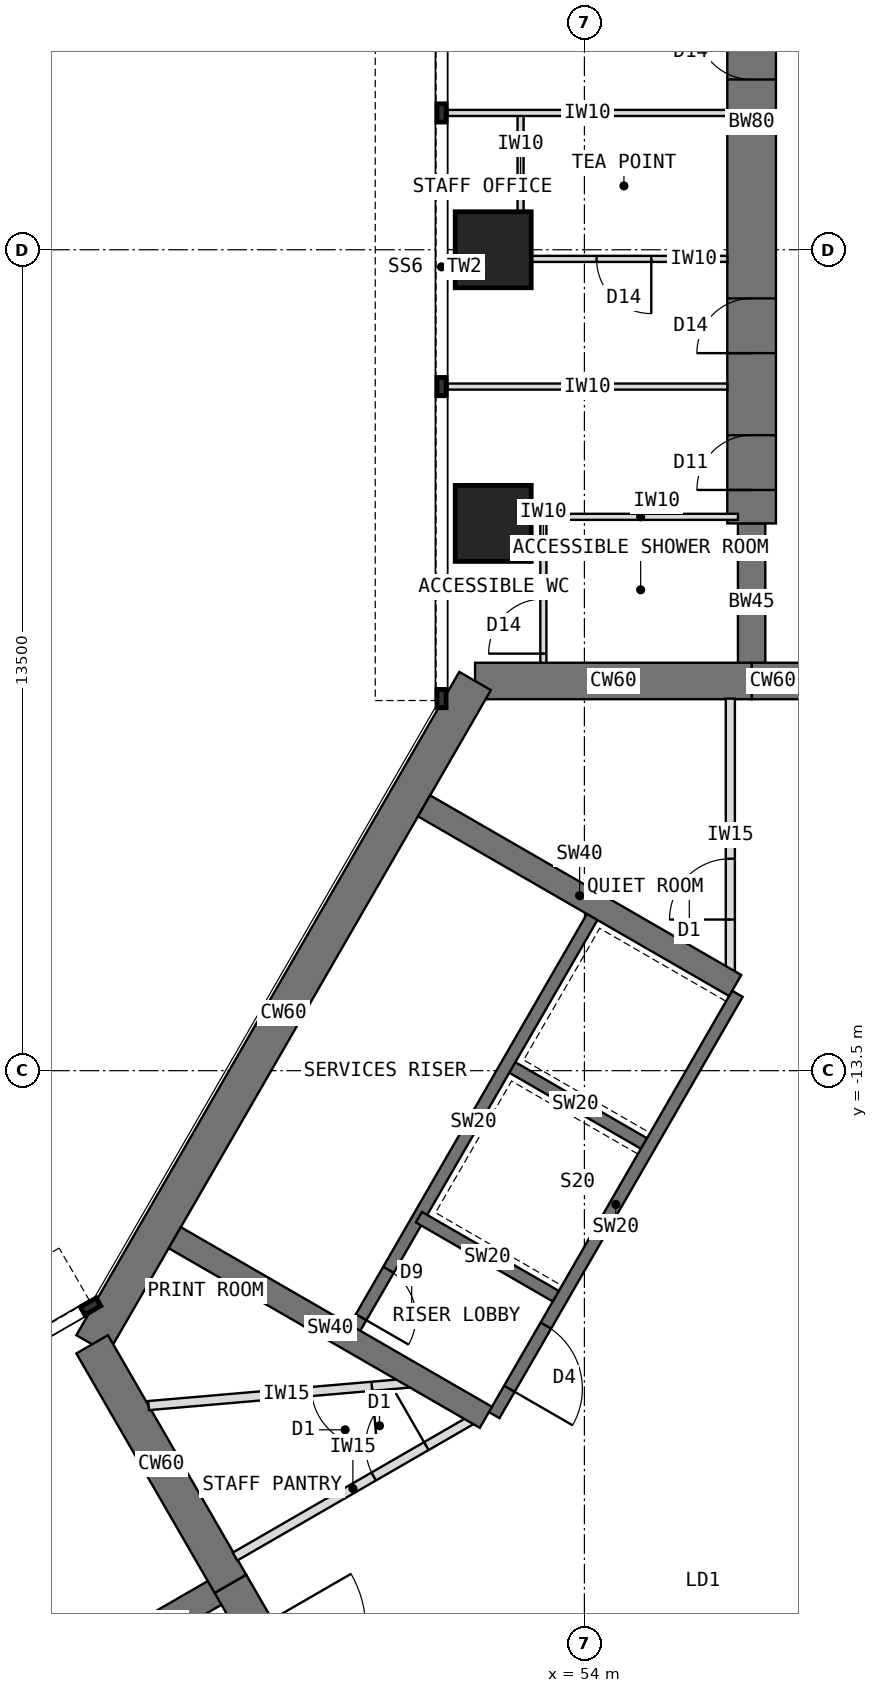
"""IFC4 building model, lengths in metres.
Left out: names, types, materials, properties, quantities, classifications, styles, units other than length and angle.
Written with IfcOpenShell. Run it as: python <this file> out.ifc"""

import sys

from ifc_helpers import new_model, si_unit, direction, frame, frame_2d, origin, origin_2d, place, context, subcontext, project, spatial, rectangle, extrude, element, fill, save


model = new_model("IFC4")
c1 = context("Model", 3, precision=1e-05, world=origin(), true_north=direction((0.0, 1.0)))
c2 = subcontext(c1, "Body", "Model", "MODEL_VIEW")
j1 = project(units=[si_unit("LENGTHUNIT", "METRE"), si_unit("PLANEANGLEUNIT", "RADIAN")], contexts=[c1])
p1 = place(None, origin())
s1 = spatial("IfcSite", under=j1, at=p1, CompositionType="ELEMENT")
p2 = place(p1, origin())
s2 = spatial("IfcBuilding", under=s1, at=p2, CompositionType="ELEMENT")
p3 = place(p2, frame((0.0, 0.0, 157.5)))
s3 = spatial("IfcBuildingStorey", under=s2, at=p3, CompositionType="ELEMENT", Elevation=157.5)
p4 = place(p3, frame((60.25, -7.092, 0.0), z_axis=(0.0, 0.0, 1.0), x_axis=(-1.0, 0.0, 0.0)))
e1 = element("IfcWall", 1, at=p4, inside=s3, PredefinedType="SHEAR", context=c2, shape_type="SweptSolid", body=[
    extrude(rectangle(XDim=3.5, YDim=0.6, at=frame_2d((1.75, 0.0))), origin(), (0.0, 0.0, 1.0), 4.0),
])
p5 = place(p4, frame((0.85, 0.0, 0.0)))
e2 = element("IfcOpeningElement", 2, at=p5, cuts=e1, PredefinedType="OPENING", context=c2, shape_type="SweptSolid", body=[
    extrude(rectangle(XDim=1.8, YDim=2.1, at=frame_2d((0.9, 1.05))), frame((0.0, 0.31, 0.0), z_axis=(0.0, -1.0, 0.0), x_axis=(1.0, 0.0, 0.0)), (0.0, 0.0, 1.0), 0.62),
])
p6 = place(p3, frame((56.75, -7.092, 0.0), z_axis=(0.0, 0.0, 1.0), x_axis=(-1.0, 0.0, 0.0)))
e3 = element("IfcWall", 3, at=p6, inside=s3, PredefinedType="SHEAR", context=c2, shape_type="SweptSolid", body=[
    extrude(rectangle(XDim=4.548, YDim=0.6, at=frame_2d((2.274, 0.0))), origin(), (0.0, 0.0, 1.0), 4.0),
])
p7 = place(p3, frame((52.202, -7.092, 0.0), z_axis=(0.0, 0.0, 1.0), x_axis=(-0.500005998175, -0.866021940709, 0.0)))
e4 = element("IfcWall", 4, at=p7, inside=s3, PredefinedType="SHEAR", context=c2, shape_type="SweptSolid", body=[
    extrude(rectangle(XDim=12.596, YDim=0.6, at=frame_2d((6.298, 0.0))), origin(), (0.0, 0.0, 1.0), 4.0),
])
p8 = place(p3, frame((45.904, -18.0, 0.0), z_axis=(0.0, 0.0, 1.0), x_axis=(0.500024481964, -0.866011268655, 0.0)))
e5 = element("IfcWall", 5, at=p8, inside=s3, PredefinedType="SHEAR", context=c2, shape_type="SweptSolid", body=[
    extrude(rectangle(XDim=4.548, YDim=0.6, at=frame_2d((2.274, 0.0))), origin(), (0.0, 0.0, 1.0), 4.0),
])
p9 = place(p3, frame((48.178, -21.939, 0.0), z_axis=(0.0, 0.0, 1.0), x_axis=(0.500010275428, -0.866019471182, 0.0)))
e6 = element("IfcWall", 6, at=p9, inside=s3, PredefinedType="SHEAR", context=c2, shape_type="SweptSolid", body=[
    extrude(rectangle(XDim=3.5, YDim=0.6, at=frame_2d((1.75, 0.0))), origin(), (0.0, 0.0, 1.0), 4.0),
])
p10 = place(p9, frame((0.85, 0.0, 0.0)))
e7 = element("IfcOpeningElement", 7, at=p10, cuts=e6, PredefinedType="OPENING", context=c2, shape_type="SweptSolid", body=[
    extrude(rectangle(XDim=1.8, YDim=2.1, at=frame_2d((0.9, 1.05))), frame((0.0, 0.31, 0.0), z_axis=(0.0, -1.0, 0.0), x_axis=(1.0, 0.0, 0.0)), (0.0, 0.0, 1.0), 0.62),
])
p11 = place(p3, frame((56.75, -7.092, 0.0), z_axis=(0.0, 0.0, 1.0), x_axis=(0.0, 1.0, 0.0)))
e8 = element("IfcWall", 8, at=p11, inside=s3, PredefinedType="SHEAR", context=c2, shape_type="SweptSolid", body=[
    extrude(rectangle(XDim=2.592, YDim=0.45, at=frame_2d((1.296, 0.0))), origin(), (0.0, 0.0, 1.0), 4.0),
])
p12 = place(p3, frame((56.75, -4.5, 0.0), z_axis=(0.0, 0.0, 1.0), x_axis=(0.0, 1.0, 0.0)))
e9 = element("IfcWall", 9, at=p12, inside=s3, PredefinedType="SHEAR", context=c2, shape_type="SweptSolid", body=[
    extrude(rectangle(XDim=13.2, YDim=0.8, at=frame_2d((6.6, 0.0))), origin(), (0.0, 0.0, 1.0), 4.0),
])
p13 = place(p12, frame((0.55, 0.0, 0.0)))
e10 = element("IfcOpeningElement", 10, at=p13, cuts=e9, PredefinedType="OPENING", context=c2, shape_type="SweptSolid", body=[
    extrude(rectangle(XDim=0.9, YDim=2.1, at=frame_2d((0.45, 1.05))), frame((0.0, 0.41, 0.0), z_axis=(0.0, -1.0, 0.0), x_axis=(1.0, 0.0, 0.0)), (0.0, 0.0, 1.0), 0.82),
])
p14 = place(p12, frame((2.8, 0.0, 0.0)))
e11 = element("IfcOpeningElement", 11, at=p14, cuts=e9, PredefinedType="OPENING", context=c2, shape_type="SweptSolid", body=[
    extrude(rectangle(XDim=0.9, YDim=2.1, at=frame_2d((0.45, 1.05))), frame((0.0, 0.41, 0.0), z_axis=(0.0, -1.0, 0.0), x_axis=(1.0, 0.0, 0.0)), (0.0, 0.0, 1.0), 0.82),
])
p15 = place(p12, frame((7.3, 0.0, 0.0)))
e12 = element("IfcOpeningElement", 12, at=p15, cuts=e9, PredefinedType="OPENING", context=c2, shape_type="SweptSolid", body=[
    extrude(rectangle(XDim=0.9, YDim=2.1, at=frame_2d((0.45, 1.05))), frame((0.0, 0.41, 0.0), z_axis=(0.0, -1.0, 0.0), x_axis=(1.0, 0.0, 0.0)), (0.0, 0.0, 1.0), 0.82),
])
p16 = place(p3, frame((48.178, -21.939, 0.0), z_axis=(0.0, 0.0, 1.0), x_axis=(-0.866072649678, -0.499918158782, 0.0)))
e13 = element("IfcWall", 13, at=p16, inside=s3, PredefinedType="SHEAR", context=c2, shape_type="SweptSolid", body=[
    extrude(rectangle(XDim=2.592, YDim=0.45, at=frame_2d((1.296, 0.0))), origin(), (0.0, 0.0, 1.0), 4.0),
])
for number, where, z_axis, x_axis in (
    (14, (52.5, -4.5, 0.0), (0.0, 0.0, 1.0), (1.0, 0.0, 0.0)),
    (15, (52.5, 0.0, 0.0), (0.0, 0.0, 1.0), (1.0, 0.0, 0.0)),
):
    element("IfcColumn", number, at=place(p3, frame(where, z_axis=z_axis, x_axis=x_axis)), inside=s3, PredefinedType="COLUMN", context=c2, shape_type="SweptSolid", body=[
        extrude(rectangle(XDim=1.25, YDim=1.25, at=origin_2d()), origin(), (0.0, 0.0, 1.0), 4.0),
    ])
p17 = place(p3, frame((56.516, -12.236, 0.0), z_axis=(0.0, 0.0, 1.0), x_axis=(-0.49999894854, -0.866026010844, 0.0)))
e16 = element("IfcWall", 16, at=p17, inside=s3, PredefinedType="SHEAR", context=c2, shape_type="SweptSolid", body=[
    extrude(rectangle(XDim=8.0, YDim=0.2, at=frame_2d((4.0, 0.0))), origin(), (0.0, 0.0, 1.0), 4.0),
])
p18 = place(p17, frame((6.3, 0.0, 0.0)))
e17 = element("IfcOpeningElement", 17, at=p18, cuts=e16, PredefinedType="OPENING", context=c2, shape_type="SweptSolid", body=[
    extrude(rectangle(XDim=1.2, YDim=2.1, at=frame_2d((0.6, 1.05))), frame((0.0, 0.11, 0.0), z_axis=(0.0, -1.0, 0.0), x_axis=(1.0, 0.0, 0.0)), (0.0, 0.0, 1.0), 0.22),
])
for number, where, z_axis, x_axis in (
    (18, (54.98, -14.697, 0.0), (0.0, 0.0, 1.0), (-0.866, 0.5, 0.0)),
    (19, (53.53, -17.209, 0.0), (0.0, 0.0, 1.0), (-0.866, 0.5, 0.0)),
):
    element("IfcWall", number, at=place(p3, frame(where, z_axis=z_axis, x_axis=x_axis)), inside=s3, PredefinedType="SHEAR", context=c2, shape_type="SweptSolid", body=[
        extrude(rectangle(XDim=2.6, YDim=0.2, at=frame_2d((1.3, 0.0))), origin(), (0.0, 0.0, 1.0), 4.0),
    ])
p19 = place(p3, frame((54.178, -10.886, 0.0), z_axis=(0.0, 0.0, 1.0), x_axis=(-0.49999894854, -0.866026010844, 0.0)))
e20 = element("IfcWall", 20, at=p19, inside=s3, PredefinedType="SHEAR", context=c2, shape_type="SweptSolid", body=[
    extrude(rectangle(XDim=8.0, YDim=0.2, at=frame_2d((4.0, 0.0))), origin(), (0.0, 0.0, 1.0), 4.0),
])
p20 = place(p19, frame((6.8, 0.0, 0.0)))
e21 = element("IfcOpeningElement", 21, at=p20, cuts=e20, PredefinedType="OPENING", context=c2, shape_type="SweptSolid", body=[
    extrude(rectangle(XDim=0.9, YDim=2.1, at=frame_2d((0.45, 1.05))), frame((0.0, 0.11, 0.0), z_axis=(0.0, -1.0, 0.0), x_axis=(1.0, 0.0, 0.0)), (0.0, 0.0, 1.0), 0.22),
])
p21 = place(p3, frame((52.38, -19.201, 0.0), z_axis=(0.0, 0.0, 1.0), x_axis=(-0.866027317282, 0.49999668571, 0.0)))
e22 = element("IfcWall", 22, at=p21, inside=s3, PredefinedType="SHEAR", context=c2, shape_type="SweptSolid", body=[
    extrude(rectangle(XDim=5.908, YDim=0.4, at=frame_2d((2.954, 0.0))), origin(), (0.0, 0.0, 1.0), 4.0),
])
p22 = place(p3, frame((56.48, -12.099, 0.0), z_axis=(0.0, 0.0, 1.0), x_axis=(-0.866009424208, 0.500027676417, 0.0)))
e23 = element("IfcWall", 23, at=p22, inside=s3, PredefinedType="SHEAR", context=c2, shape_type="SweptSolid", body=[
    extrude(rectangle(XDim=5.908, YDim=0.4, at=frame_2d((2.954, 0.0))), origin(), (0.0, 0.0, 1.0), 4.0),
])
for number, where, z_axis, x_axis in (
    (24, (56.35, -2.25, 0.0), (0.0, 0.0, 1.0), (-1.0, 0.0, 0.0)),
    (25, (56.35, 2.25, 0.0), (0.0, 0.0, 1.0), (-1.0, 0.0, 0.0)),
):
    element("IfcWall", number, at=place(p3, frame(where, z_axis=z_axis, x_axis=x_axis)), inside=s3, PredefinedType="PARTITIONING", context=c2, shape_type="SweptSolid", body=[
        extrude(rectangle(XDim=4.6, YDim=0.1, at=frame_2d((2.3, 0.0))), origin(), (0.0, 0.0, 1.0), 3.8),
    ])
p23 = place(p3, frame((52.95, -0.15, 0.0), z_axis=(0.0, 0.0, 1.0), x_axis=(0.0, 1.0, 0.0)))
e26 = element("IfcWall", 26, at=p23, inside=s3, PredefinedType="PARTITIONING", context=c2, shape_type="SweptSolid", body=[
    extrude(rectangle(XDim=2.4, YDim=0.1, at=frame_2d((1.2, 0.0))), origin(), (0.0, 0.0, 1.0), 3.8),
])
p24 = place(p3, frame((56.35, -0.15, 0.0), z_axis=(0.0, 0.0, 1.0), x_axis=(-1.0, 0.0, 0.0)))
e27 = element("IfcWall", 27, at=p24, inside=s3, PredefinedType="PARTITIONING", context=c2, shape_type="SweptSolid", body=[
    extrude(rectangle(XDim=3.4, YDim=0.1, at=frame_2d((1.7, 0.0))), origin(), (0.0, 0.0, 1.0), 3.8),
])
p25 = place(p24, frame((1.25, 0.0, 0.0)))
e28 = element("IfcOpeningElement", 28, at=p25, cuts=e27, PredefinedType="OPENING", context=c2, shape_type="SweptSolid", body=[
    extrude(rectangle(XDim=0.9, YDim=2.1, at=frame_2d((0.45, 1.05))), frame((0.0, 0.06, 0.0), z_axis=(0.0, -1.0, 0.0), x_axis=(1.0, 0.0, 0.0)), (0.0, 0.0, 1.0), 0.12),
])
p26 = place(p3, frame((53.325, -6.792, 0.0), z_axis=(0.0, 0.0, 1.0), x_axis=(0.0, 1.0, 0.0)))
e29 = element("IfcWall", 29, at=p26, inside=s3, PredefinedType="PARTITIONING", context=c2, shape_type="SweptSolid", body=[
    extrude(rectangle(XDim=2.4, YDim=0.1, at=frame_2d((1.2, 0.0))), origin(), (0.0, 0.0, 1.0), 3.8),
])
p27 = place(p26, frame((0.15, 0.0, 0.0)))
e30 = element("IfcOpeningElement", 30, at=p27, cuts=e29, PredefinedType="OPENING", context=c2, shape_type="SweptSolid", body=[
    extrude(rectangle(XDim=0.9, YDim=2.1, at=frame_2d((0.45, 1.05))), frame((0.0, 0.06, 0.0), z_axis=(0.0, -1.0, 0.0), x_axis=(1.0, 0.0, 0.0)), (0.0, 0.0, 1.0), 0.12),
])
p28 = place(p3, frame((56.525, -4.392, 0.0), z_axis=(0.0, 0.0, 1.0), x_axis=(-1.0, 0.0, 0.0)))
e31 = element("IfcWall", 31, at=p28, inside=s3, PredefinedType="PARTITIONING", context=c2, shape_type="SweptSolid", body=[
    extrude(rectangle(XDim=3.2, YDim=0.1, at=frame_2d((1.6, 0.0))), origin(), (0.0, 0.0, 1.0), 3.8),
])
p29 = place(p3, frame((48.254, -21.49, 0.0), z_axis=(0.0, 0.0, 1.0), x_axis=(0.866025707867, 0.499999473313, 0.0)))
e32 = element("IfcWall", 32, at=p29, inside=s3, PredefinedType="PARTITIONING", context=c2, shape_type="SweptSolid", body=[
    extrude(rectangle(XDim=4.476, YDim=0.15, at=frame_2d((2.238, 0.0))), origin(), (0.0, 0.0, 1.0), 3.8),
])
p30 = place(p29, frame((2.633, 0.0, 0.0)))
e33 = element("IfcOpeningElement", 33, at=p30, cuts=e32, PredefinedType="OPENING", context=c2, shape_type="SweptSolid", body=[
    extrude(rectangle(XDim=1.0, YDim=2.1, at=frame_2d((0.5, 1.05))), frame((0.0, 0.085, 0.0), z_axis=(0.0, -1.0, 0.0), x_axis=(1.0, 0.0, 0.0)), (0.0, 0.0, 1.0), 0.17),
])
p31 = place(p3, frame((56.4, -11.857, 0.0), z_axis=(0.0, 0.0, 1.0), x_axis=(0.0, 1.0, 0.0)))
e34 = element("IfcWall", 34, at=p31, inside=s3, PredefinedType="PARTITIONING", context=c2, shape_type="SweptSolid", body=[
    extrude(rectangle(XDim=4.476, YDim=0.15, at=frame_2d((2.238, 0.0))), origin(), (0.0, 0.0, 1.0), 3.8),
])
p32 = place(p31, frame((0.843, 0.0, 0.0)))
e35 = element("IfcOpeningElement", 35, at=p32, cuts=e34, PredefinedType="OPENING", context=c2, shape_type="SweptSolid", body=[
    extrude(rectangle(XDim=1.0, YDim=2.1, at=frame_2d((0.5, 1.05))), frame((0.0, 0.085, 0.0), z_axis=(0.0, -1.0, 0.0), x_axis=(1.0, 0.0, 0.0)), (0.0, 0.0, 1.0), 0.17),
])
p33 = place(p3, frame((51.367, -18.616, 0.0), z_axis=(0.0, 0.0, 1.0), x_axis=(-0.996291540593, -0.086041653535, 0.0)))
e36 = element("IfcWall", 36, at=p33, inside=s3, PredefinedType="PARTITIONING", context=c2, shape_type="SweptSolid", body=[
    extrude(rectangle(XDim=4.551, YDim=0.15, at=frame_2d((2.276, 0.0))), origin(), (0.0, 0.0, 1.0), 3.8),
])
p34 = place(p33, frame((0.865, 0.0, 0.0)))
e37 = element("IfcOpeningElement", 37, at=p34, cuts=e36, PredefinedType="OPENING", context=c2, shape_type="SweptSolid", body=[
    extrude(rectangle(XDim=1.0, YDim=2.1, at=frame_2d((0.5, 1.05))), frame((0.0, 0.085, 0.0), z_axis=(0.0, -1.0, 0.0), x_axis=(1.0, 0.0, 0.0)), (0.0, 0.0, 1.0), 0.17),
])
p35 = place(p18, origin())
e38 = element("IfcDoor", 38, at=p35, inside=s3, OperationType="SINGLE_SWING_RIGHT", PredefinedType="DOOR", context=c2, shape_type="SweptSolid", body=[
    extrude(rectangle(XDim=1.2, YDim=2.1, at=frame_2d((0.6, 1.05))), frame((0.0, 0.025, 0.0), z_axis=(0.0, -1.0, 0.0), x_axis=(1.0, 0.0, 0.0)), (0.0, 0.0, 1.0), 0.05),
])
fill(e17, e38)
p36 = place(p20, origin())
e39 = element("IfcDoor", 39, at=p36, inside=s3, OperationType="SINGLE_SWING_RIGHT", PredefinedType="DOOR", context=c2, shape_type="SweptSolid", body=[
    extrude(rectangle(XDim=0.9, YDim=2.1, at=frame_2d((0.45, 1.05))), frame((0.0, 0.025, 0.0), z_axis=(0.0, -1.0, 0.0), x_axis=(1.0, 0.0, 0.0)), (0.0, 0.0, 1.0), 0.05),
])
fill(e21, e39)
p37 = place(p25, origin())
e40 = element("IfcDoor", 40, at=p37, inside=s3, OperationType="SINGLE_SWING_LEFT", PredefinedType="DOOR", context=c2, shape_type="SweptSolid", body=[
    extrude(rectangle(XDim=0.9, YDim=2.1, at=frame_2d((0.45, 1.05))), frame((0.0, 0.025, 0.0), z_axis=(0.0, -1.0, 0.0), x_axis=(1.0, 0.0, 0.0)), (0.0, 0.0, 1.0), 0.05),
])
fill(e28, e40)
p38 = place(p27, origin())
e41 = element("IfcDoor", 41, at=p38, inside=s3, OperationType="SINGLE_SWING_LEFT", PredefinedType="DOOR", context=c2, shape_type="SweptSolid", body=[
    extrude(rectangle(XDim=0.9, YDim=2.1, at=frame_2d((0.45, 1.05))), frame((0.0, 0.025, 0.0), z_axis=(0.0, -1.0, 0.0), x_axis=(1.0, 0.0, 0.0)), (0.0, 0.0, 1.0), 0.05),
])
fill(e30, e41)
p39 = place(p34, origin())
e42 = element("IfcDoor", 42, at=p39, inside=s3, OperationType="SINGLE_SWING_LEFT", PredefinedType="DOOR", context=c2, shape_type="SweptSolid", body=[
    extrude(rectangle(XDim=1.0, YDim=2.1, at=frame_2d((0.5, 1.05))), frame((0.0, 0.025, 0.0), z_axis=(0.0, -1.0, 0.0), x_axis=(1.0, 0.0, 0.0)), (0.0, 0.0, 1.0), 0.05),
])
fill(e37, e42)
p40 = place(p30, origin())
e43 = element("IfcDoor", 43, at=p40, inside=s3, OperationType="SINGLE_SWING_RIGHT", PredefinedType="DOOR", context=c2, shape_type="SweptSolid", body=[
    extrude(rectangle(XDim=1.0, YDim=2.1, at=frame_2d((0.5, 1.05))), frame((0.0, 0.025, 0.0), z_axis=(0.0, -1.0, 0.0), x_axis=(1.0, 0.0, 0.0)), (0.0, 0.0, 1.0), 0.05),
])
fill(e33, e43)
p41 = place(p32, origin())
e44 = element("IfcDoor", 44, at=p41, inside=s3, OperationType="SINGLE_SWING_LEFT", PredefinedType="DOOR", context=c2, shape_type="SweptSolid", body=[
    extrude(rectangle(XDim=1.0, YDim=2.1, at=frame_2d((0.5, 1.05))), frame((0.0, 0.025, 0.0), z_axis=(0.0, -1.0, 0.0), x_axis=(1.0, 0.0, 0.0)), (0.0, 0.0, 1.0), 0.05),
])
fill(e35, e44)
p42 = place(p13, origin())
e45 = element("IfcDoor", 45, at=p42, inside=s3, OperationType="SINGLE_SWING_LEFT", PredefinedType="DOOR", context=c2, shape_type="SweptSolid", body=[
    extrude(rectangle(XDim=0.82, YDim=2.06, at=frame_2d((0.45, 1.03))), frame((0.0, 0.025, 0.0), z_axis=(0.0, -1.0, 0.0), x_axis=(1.0, 0.0, 0.0)), (0.0, 0.0, 1.0), 0.05),
    extrude(rectangle(XDim=0.04, YDim=2.1, at=frame_2d((0.02, 1.05))), frame((0.0, 0.4, 0.0), z_axis=(0.0, -1.0, 0.0), x_axis=(1.0, 0.0, 0.0)), (0.0, 0.0, 1.0), 0.8),
    extrude(rectangle(XDim=0.04, YDim=2.1, at=frame_2d((0.88, 1.05))), frame((0.0, 0.4, 0.0), z_axis=(0.0, -1.0, 0.0), x_axis=(1.0, 0.0, 0.0)), (0.0, 0.0, 1.0), 0.8),
    extrude(rectangle(XDim=0.82, YDim=0.04, at=frame_2d((0.45, 2.08))), frame((0.0, 0.4, 0.0), z_axis=(0.0, -1.0, 0.0), x_axis=(1.0, 0.0, 0.0)), (0.0, 0.0, 1.0), 0.8),
])
fill(e10, e45)
p43 = place(p14, origin())
e46 = element("IfcDoor", 46, at=p43, inside=s3, OperationType="SINGLE_SWING_LEFT", PredefinedType="DOOR", context=c2, shape_type="SweptSolid", body=[
    extrude(rectangle(XDim=0.82, YDim=2.06, at=frame_2d((0.45, 1.03))), frame((0.0, 0.025, 0.0), z_axis=(0.0, -1.0, 0.0), x_axis=(1.0, 0.0, 0.0)), (0.0, 0.0, 1.0), 0.05),
    extrude(rectangle(XDim=0.04, YDim=2.1, at=frame_2d((0.02, 1.05))), frame((0.0, 0.4, 0.0), z_axis=(0.0, -1.0, 0.0), x_axis=(1.0, 0.0, 0.0)), (0.0, 0.0, 1.0), 0.8),
    extrude(rectangle(XDim=0.04, YDim=2.1, at=frame_2d((0.88, 1.05))), frame((0.0, 0.4, 0.0), z_axis=(0.0, -1.0, 0.0), x_axis=(1.0, 0.0, 0.0)), (0.0, 0.0, 1.0), 0.8),
    extrude(rectangle(XDim=0.82, YDim=0.04, at=frame_2d((0.45, 2.08))), frame((0.0, 0.4, 0.0), z_axis=(0.0, -1.0, 0.0), x_axis=(1.0, 0.0, 0.0)), (0.0, 0.0, 1.0), 0.8),
])
fill(e11, e46)
p44 = place(p15, origin())
e47 = element("IfcDoor", 47, at=p44, inside=s3, OperationType="SINGLE_SWING_RIGHT", PredefinedType="DOOR", context=c2, shape_type="SweptSolid", body=[
    extrude(rectangle(XDim=0.82, YDim=2.06, at=frame_2d((0.45, 1.03))), frame((0.0, 0.025, 0.0), z_axis=(0.0, -1.0, 0.0), x_axis=(1.0, 0.0, 0.0)), (0.0, 0.0, 1.0), 0.05),
    extrude(rectangle(XDim=0.04, YDim=2.1, at=frame_2d((0.02, 1.05))), frame((0.0, 0.4, 0.0), z_axis=(0.0, -1.0, 0.0), x_axis=(1.0, 0.0, 0.0)), (0.0, 0.0, 1.0), 0.8),
    extrude(rectangle(XDim=0.04, YDim=2.1, at=frame_2d((0.88, 1.05))), frame((0.0, 0.4, 0.0), z_axis=(0.0, -1.0, 0.0), x_axis=(1.0, 0.0, 0.0)), (0.0, 0.0, 1.0), 0.8),
    extrude(rectangle(XDim=0.82, YDim=0.04, at=frame_2d((0.45, 2.08))), frame((0.0, 0.4, 0.0), z_axis=(0.0, -1.0, 0.0), x_axis=(1.0, 0.0, 0.0)), (0.0, 0.0, 1.0), 0.8),
])
fill(e12, e47)
save(model, sys.argv[1])
